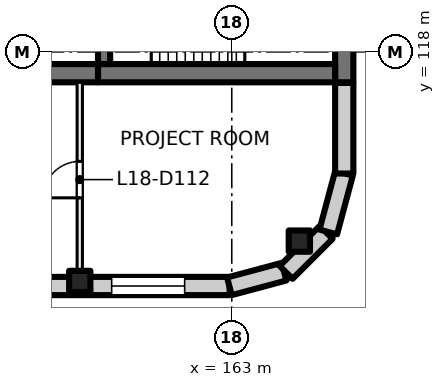
"""IFC4 building model, lengths in metres.
Left out: names, types, materials, properties, quantities, classifications, styles, units other than length and angle.
Written with IfcOpenShell. Run it as: python <this file> out.ifc"""

import sys

from ifc_helpers import new_model, si_unit, direction, frame, frame_2d, origin, origin_2d, place, context, subcontext, project, spatial, rectangle, extrude, element, fill, save


model = new_model("IFC4")
c1 = context("Model", 3, precision=1e-05, world=origin(), true_north=direction((0.0, 1.0)))
c2 = subcontext(c1, "Body", "Model", "MODEL_VIEW")
j1 = project(units=[si_unit("LENGTHUNIT", "METRE"), si_unit("PLANEANGLEUNIT", "RADIAN")], contexts=[c1])
p1 = place(None, origin())
s1 = spatial("IfcSite", under=j1, at=p1, CompositionType="ELEMENT")
p2 = place(p1, origin())
s2 = spatial("IfcBuilding", under=s1, at=p2, CompositionType="ELEMENT")
p3 = place(p2, frame((0.0, 0.0, 81.0)))
s3 = spatial("IfcBuildingStorey", under=s2, at=p3, CompositionType="ELEMENT", Elevation=81.0)
for number, where, z_axis, x_axis in (
    (1, (165.223, 111.777, 0.0), (0.0, 0.0, 1.0), (1.0, 0.0, 0.0)),
    (2, (158.0, 110.45, 0.0), (0.0, 0.0, 1.0), (1.0, 0.0, 0.0)),
):
    element("IfcColumn", number, at=place(p3, frame(where, z_axis=z_axis, x_axis=x_axis)), inside=s3, PredefinedType="COLUMN", context=c2, shape_type="SweptSolid", body=[
        extrude(rectangle(XDim=0.7, YDim=0.7, at=origin_2d()), origin(), (0.0, 0.0, 1.0), 4.0),
    ])
p4 = place(p3, frame((166.7, 120.8, 0.0), z_axis=(0.0, 0.0, 1.0), x_axis=(0.0, -1.0, 0.0)))
e3 = element("IfcWall", 3, at=p4, inside=s3, PredefinedType="SHEAR", context=c2, shape_type="SweptSolid", body=[
    extrude(rectangle(XDim=3.8, YDim=0.6, at=frame_2d((1.9, 0.0))), origin(), (0.0, 0.0, 1.0), 4.0),
])
p5 = place(p3, frame((166.4, 117.3, 0.0), z_axis=(0.0, 0.0, 1.0), x_axis=(-1.0, 0.0, 0.0)))
e4 = element("IfcWall", 4, at=p5, inside=s3, PredefinedType="SHEAR", context=c2, shape_type="SweptSolid", body=[
    extrude(rectangle(XDim=7.8, YDim=0.6, at=frame_2d((3.9, 0.0))), origin(), (0.0, 0.0, 1.0), 4.0),
])
p6 = place(p3, frame((158.6, 117.3, 0.0), z_axis=(0.0, 0.0, 1.0), x_axis=(-1.0, 0.0, 0.0)))
e5 = element("IfcWall", 5, at=p6, inside=s3, PredefinedType="SHEAR", context=c2, shape_type="SweptSolid", body=[
    extrude(rectangle(XDim=4.6, YDim=0.6, at=frame_2d((2.3, 0.0))), origin(), (0.0, 0.0, 1.0), 4.0),
])
p7 = place(p3, frame((158.8, 120.4, 0.0), z_axis=(0.0, 0.0, 1.0), x_axis=(0.0, -1.0, 0.0)))
e6 = element("IfcWall", 6, at=p7, inside=s3, PredefinedType="SHEAR", context=c2, shape_type="SweptSolid", body=[
    extrude(rectangle(XDim=2.8, YDim=0.4, at=frame_2d((1.4, 0.0))), origin(), (0.0, 0.0, 1.0), 4.0),
])
p8 = place(p7, frame((0.9, 0.0, 0.0)))
e7 = element("IfcOpeningElement", 7, at=p8, cuts=e6, PredefinedType="OPENING", context=c2, shape_type="SweptSolid", body=[
    extrude(rectangle(XDim=1.0, YDim=2.1, at=frame_2d((0.5, 1.05))), frame((0.0, 0.21, 0.0), z_axis=(0.0, -1.0, 0.0), x_axis=(1.0, 0.0, 0.0)), (0.0, 0.0, 1.0), 0.42),
])
p9 = place(p3, frame((162.93, 110.3, 0.0), z_axis=(0.0, 0.0, 1.0), x_axis=(-1.0, 0.0, 0.0)))
e8 = element("IfcWall", 8, at=p9, inside=s3, PredefinedType="SOLIDWALL", context=c2, shape_type="SweptSolid", body=[
    extrude(rectangle(XDim=31.93, YDim=0.6, at=frame_2d((15.965, 0.0))), origin(), (0.0, 0.0, 1.0), 3.625),
])
p10 = place(p9, frame((1.48, 0.0, 0.9)))
e9 = element("IfcOpeningElement", 9, at=p10, cuts=e8, PredefinedType="OPENING", context=c2, shape_type="SweptSolid", body=[
    extrude(rectangle(XDim=2.4, YDim=2.4, at=frame_2d((1.2, 1.2))), frame((0.0, 0.31, 0.0), z_axis=(0.0, -1.0, 0.0), x_axis=(1.0, 0.0, 0.0)), (0.0, 0.0, 1.0), 0.62),
])
p11 = place(p9, frame((5.98, 0.0, 0.9)))
e10 = element("IfcOpeningElement", 10, at=p11, cuts=e8, PredefinedType="OPENING", context=c2, shape_type="SweptSolid", body=[
    extrude(rectangle(XDim=2.4, YDim=2.4, at=frame_2d((1.2, 1.2))), frame((0.0, 0.31, 0.0), z_axis=(0.0, -1.0, 0.0), x_axis=(1.0, 0.0, 0.0)), (0.0, 0.0, 1.0), 0.62),
])
p12 = place(p9, frame((10.48, 0.0, 0.9)))
e11 = element("IfcOpeningElement", 11, at=p12, cuts=e8, PredefinedType="OPENING", context=c2, shape_type="SweptSolid", body=[
    extrude(rectangle(XDim=2.4, YDim=2.4, at=frame_2d((1.2, 1.2))), frame((0.0, 0.31, 0.0), z_axis=(0.0, -1.0, 0.0), x_axis=(1.0, 0.0, 0.0)), (0.0, 0.0, 1.0), 0.62),
])
p13 = place(p9, frame((14.98, 0.0, 0.9)))
e12 = element("IfcOpeningElement", 12, at=p13, cuts=e8, PredefinedType="OPENING", context=c2, shape_type="SweptSolid", body=[
    extrude(rectangle(XDim=2.4, YDim=2.4, at=frame_2d((1.2, 1.2))), frame((0.0, 0.31, 0.0), z_axis=(0.0, -1.0, 0.0), x_axis=(1.0, 0.0, 0.0)), (0.0, 0.0, 1.0), 0.62),
])
p14 = place(p9, frame((19.48, 0.0, 0.9)))
e13 = element("IfcOpeningElement", 13, at=p14, cuts=e8, PredefinedType="OPENING", context=c2, shape_type="SweptSolid", body=[
    extrude(rectangle(XDim=2.4, YDim=2.4, at=frame_2d((1.2, 1.2))), frame((0.0, 0.31, 0.0), z_axis=(0.0, -1.0, 0.0), x_axis=(1.0, 0.0, 0.0)), (0.0, 0.0, 1.0), 0.62),
])
p15 = place(p9, frame((23.98, 0.0, 0.9)))
e14 = element("IfcOpeningElement", 14, at=p15, cuts=e8, PredefinedType="OPENING", context=c2, shape_type="SweptSolid", body=[
    extrude(rectangle(XDim=2.4, YDim=2.4, at=frame_2d((1.2, 1.2))), frame((0.0, 0.31, 0.0), z_axis=(0.0, -1.0, 0.0), x_axis=(1.0, 0.0, 0.0)), (0.0, 0.0, 1.0), 0.62),
])
p16 = place(p9, frame((28.48, 0.0, 0.9)))
e15 = element("IfcOpeningElement", 15, at=p16, cuts=e8, PredefinedType="OPENING", context=c2, shape_type="SweptSolid", body=[
    extrude(rectangle(XDim=2.4, YDim=2.4, at=frame_2d((1.2, 1.2))), frame((0.0, 0.31, 0.0), z_axis=(0.0, -1.0, 0.0), x_axis=(1.0, 0.0, 0.0)), (0.0, 0.0, 1.0), 0.62),
])
for number, where, z_axis, x_axis in (
    (16, (164.719, 110.771, 0.0), (0.0, 0.0, 1.0), (-0.966, -0.259, 0.0)),
    (17, (166.104, 112.064, 0.0), (0.0, 0.0, 1.0), (-0.707, -0.707, 0.0)),
):
    element("IfcWall", number, at=place(p3, frame(where, z_axis=z_axis, x_axis=x_axis)), inside=s3, PredefinedType="SOLIDWALL", context=c2, shape_type="SweptSolid", body=[
        extrude(rectangle(XDim=1.861, YDim=0.6, at=frame_2d((0.93, 0.0))), origin(), (0.0, 0.0, 1.0), 3.625),
    ])
p17 = place(p3, frame((166.692, 114.01, 0.0), z_axis=(0.0, 0.0, 1.0), x_axis=(-0.258839784042, -0.965920269068, 0.0)))
e18 = element("IfcWall", 18, at=p17, inside=s3, PredefinedType="SOLIDWALL", context=c2, shape_type="SweptSolid", body=[
    extrude(rectangle(XDim=2.0, YDim=0.6, at=frame_2d((1.0, 0.0))), origin(), (0.0, 0.0, 1.0), 3.625),
])
p18 = place(p3, frame((166.7, 116.98, 0.0), z_axis=(0.0, 0.0, 1.0), x_axis=(0.0, -1.0, 0.0)))
e19 = element("IfcWall", 19, at=p18, inside=s3, PredefinedType="SOLIDWALL", context=c2, shape_type="SweptSolid", body=[
    extrude(rectangle(XDim=2.98, YDim=0.6, at=frame_2d((1.49, 0.0))), origin(), (0.0, 0.0, 1.0), 3.625),
])
p19 = place(p3, frame((158.0, 110.6, 0.0), z_axis=(0.0, 0.0, 1.0), x_axis=(0.0, 1.0, 0.0)))
e20 = element("IfcWall", 20, at=p19, inside=s3, PredefinedType="PARTITIONING", context=c2, shape_type="SweptSolid", body=[
    extrude(rectangle(XDim=6.4, YDim=0.175, at=frame_2d((3.2, 0.0))), origin(), (0.0, 0.0, 1.0), 3.625),
])
p20 = place(p19, frame((2.6, 0.0, 0.0)))
e21 = element("IfcOpeningElement", 21, at=p20, cuts=e20, PredefinedType="OPENING", context=c2, shape_type="SweptSolid", body=[
    extrude(rectangle(XDim=1.2, YDim=2.1, at=frame_2d((0.6, 1.05))), frame((0.0, 0.097, 0.0), z_axis=(0.0, -1.0, 0.0), x_axis=(1.0, 0.0, 0.0)), (0.0, 0.0, 1.0), 0.195),
])
p21 = place(p10, origin())
e22 = element("IfcWindow", 22, at=p21, inside=s3, PartitioningType="SINGLE_PANEL", PredefinedType="WINDOW", context=c2, shape_type="SweptSolid", body=[
    extrude(rectangle(XDim=2.4, YDim=2.4, at=frame_2d((1.2, 1.2))), frame((0.0, 0.03, 0.0), z_axis=(0.0, -1.0, 0.0), x_axis=(1.0, 0.0, 0.0)), (0.0, 0.0, 1.0), 0.06),
])
fill(e9, e22)
p22 = place(p20, origin())
e23 = element("IfcDoor", 23, at=p22, inside=s3, OperationType="DOUBLE_DOOR_SINGLE_SWING", PredefinedType="DOOR", context=c2, shape_type="SweptSolid", body=[
    extrude(rectangle(XDim=1.2, YDim=2.1, at=frame_2d((0.6, 1.05))), frame((0.0, 0.025, 0.0), z_axis=(0.0, -1.0, 0.0), x_axis=(1.0, 0.0, 0.0)), (0.0, 0.0, 1.0), 0.05),
])
fill(e21, e23)
save(model, sys.argv[1])
